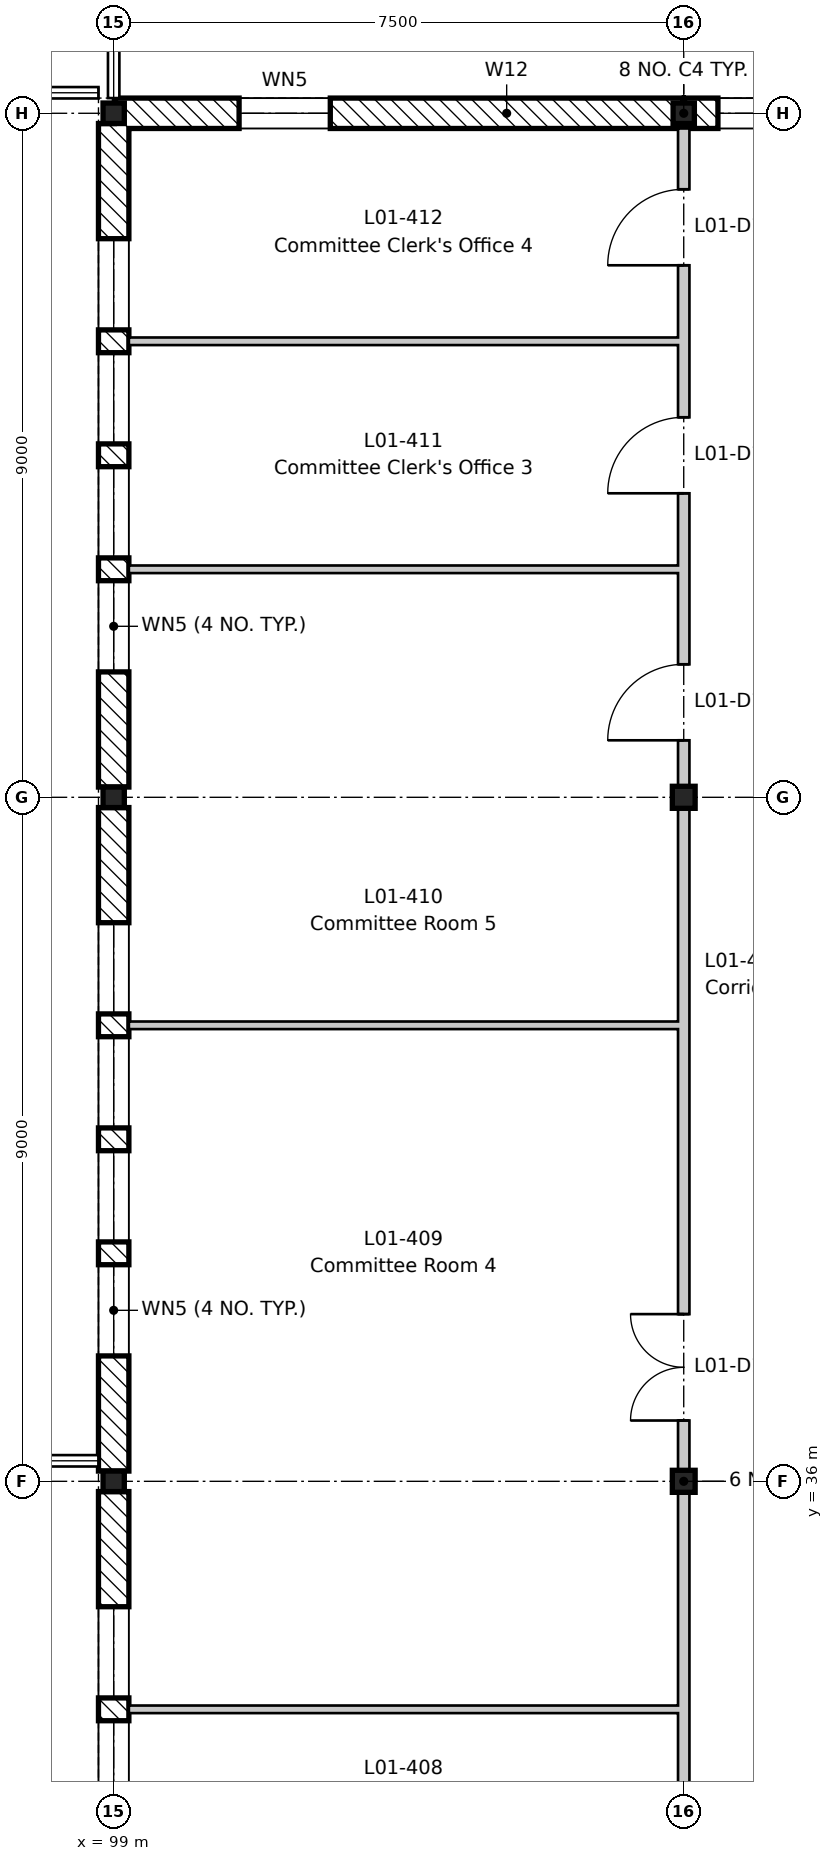
"""IFC4 building model, lengths in metres.
Left out: names, types, materials, properties, quantities, classifications, styles, units other than length and angle.
Written with IfcOpenShell. Run it as: python <this file> out.ifc"""

import sys

from ifc_helpers import new_model, si_unit, direction, frame, frame_2d, origin, origin_2d, place, context, subcontext, project, spatial, rectangle, i_section, extrude, element, fill, save


model = new_model("IFC4")
c1 = context("Model", 3, precision=1e-05, world=origin(), true_north=direction((0.0, 1.0)))
c2 = subcontext(c1, "Body", "Model", "MODEL_VIEW")
j1 = project(units=[si_unit("LENGTHUNIT", "METRE"), si_unit("PLANEANGLEUNIT", "RADIAN")], contexts=[c1])
p1 = place(None, origin())
s1 = spatial("IfcSite", under=j1, at=p1, CompositionType="ELEMENT")
p2 = place(p1, origin())
s2 = spatial("IfcBuilding", under=s1, at=p2, CompositionType="ELEMENT")
p3 = place(p2, frame((0.0, 0.0, 5.4)))
s3 = spatial("IfcBuildingStorey", under=s2, at=p3, CompositionType="ELEMENT", Elevation=5.4)
for number, where, z_axis, x_axis in (
    (1, (99.0, 36.0, -0.2), (0.0, 0.0, 1.0), (1.0, 0.0, 0.0)),
    (2, (99.0, 45.0, -0.2), (0.0, 0.0, 1.0), (1.0, 0.0, 0.0)),
    (3, (99.0, 54.0, -0.2), (0.0, 0.0, 1.0), (1.0, 0.0, 0.0)),
):
    element("IfcColumn", number, at=place(p3, frame(where, z_axis=z_axis, x_axis=x_axis)), inside=s3, PredefinedType="COLUMN", context=c2, shape_type="SweptSolid", body=[
        extrude(i_section(OverallWidth=0.28, OverallDepth=0.27, WebThickness=0.008, FlangeThickness=0.013, FilletRadius=0.024, at=origin_2d()), origin(), (0.0, 0.0, 1.0), 4.5),
    ])
for number, where, z_axis, x_axis in (
    (4, (106.5, 36.0, -0.2), (0.0, 0.0, 1.0), (1.0, 0.0, 0.0)),
    (5, (106.5, 45.0, -0.2), (0.0, 0.0, 1.0), (1.0, 0.0, 0.0)),
):
    element("IfcColumn", number, at=place(p3, frame(where, z_axis=z_axis, x_axis=x_axis)), inside=s3, PredefinedType="COLUMN", context=c2, shape_type="SweptSolid", body=[
        extrude(i_section(OverallWidth=0.3, OverallDepth=0.29, WebThickness=0.009, FlangeThickness=0.014, FilletRadius=0.027, at=origin_2d()), origin(), (0.0, 0.0, 1.0), 4.5),
    ])
p4 = place(p3, frame((106.5, 54.0, -0.2), z_axis=(0.0, 0.0, 1.0), x_axis=(1.0, 0.0, 0.0)))
e6 = element("IfcColumn", 6, at=p4, inside=s3, PredefinedType="COLUMN", context=c2, shape_type="SweptSolid", body=[
    extrude(i_section(OverallWidth=0.28, OverallDepth=0.27, WebThickness=0.008, FlangeThickness=0.013, FilletRadius=0.024, at=origin_2d()), origin(), (0.0, 0.0, 1.0), 4.5),
])
p5 = place(p3, frame((99.0, 27.135, 0.0), z_axis=(0.0, 0.0, 1.0), x_axis=(0.0, 1.0, 0.0)))
e7 = element("IfcWall", 7, at=p5, inside=s3, PredefinedType="STANDARD", context=c2, shape_type="SweptSolid", body=[
    extrude(rectangle(XDim=8.73, YDim=0.4, at=frame_2d((4.365, 0.0))), origin(), (0.0, 0.0, 1.0), 3.9),
])
p6 = place(p5, frame((1.515, 0.0, 0.6)))
e8 = element("IfcOpeningElement", 8, at=p6, cuts=e7, PredefinedType="OPENING", context=c2, shape_type="SweptSolid", body=[
    extrude(rectangle(XDim=1.2, YDim=3.0, at=frame_2d((0.6, 1.5))), frame((0.0, 0.21, 0.0), z_axis=(0.0, -1.0, 0.0), x_axis=(1.0, 0.0, 0.0)), (0.0, 0.0, 1.0), 0.42),
])
p7 = place(p5, frame((3.015, 0.0, 0.6)))
e9 = element("IfcOpeningElement", 9, at=p7, cuts=e7, PredefinedType="OPENING", context=c2, shape_type="SweptSolid", body=[
    extrude(rectangle(XDim=1.2, YDim=3.0, at=frame_2d((0.6, 1.5))), frame((0.0, 0.21, 0.0), z_axis=(0.0, -1.0, 0.0), x_axis=(1.0, 0.0, 0.0)), (0.0, 0.0, 1.0), 0.42),
])
p8 = place(p5, frame((4.515, 0.0, 0.6)))
e10 = element("IfcOpeningElement", 10, at=p8, cuts=e7, PredefinedType="OPENING", context=c2, shape_type="SweptSolid", body=[
    extrude(rectangle(XDim=1.2, YDim=3.0, at=frame_2d((0.6, 1.5))), frame((0.0, 0.21, 0.0), z_axis=(0.0, -1.0, 0.0), x_axis=(1.0, 0.0, 0.0)), (0.0, 0.0, 1.0), 0.42),
])
p9 = place(p5, frame((6.015, 0.0, 0.6)))
e11 = element("IfcOpeningElement", 11, at=p9, cuts=e7, PredefinedType="OPENING", context=c2, shape_type="SweptSolid", body=[
    extrude(rectangle(XDim=1.2, YDim=3.0, at=frame_2d((0.6, 1.5))), frame((0.0, 0.21, 0.0), z_axis=(0.0, -1.0, 0.0), x_axis=(1.0, 0.0, 0.0)), (0.0, 0.0, 1.0), 0.42),
])
p10 = place(p3, frame((99.0, 36.135, 0.0), z_axis=(0.0, 0.0, 1.0), x_axis=(0.0, 1.0, 0.0)))
e12 = element("IfcWall", 12, at=p10, inside=s3, PredefinedType="STANDARD", context=c2, shape_type="SweptSolid", body=[
    extrude(rectangle(XDim=8.73, YDim=0.4, at=frame_2d((4.365, 0.0))), origin(), (0.0, 0.0, 1.0), 3.9),
])
p11 = place(p10, frame((1.515, 0.0, 0.6)))
e13 = element("IfcOpeningElement", 13, at=p11, cuts=e12, PredefinedType="OPENING", context=c2, shape_type="SweptSolid", body=[
    extrude(rectangle(XDim=1.2, YDim=3.0, at=frame_2d((0.6, 1.5))), frame((0.0, 0.21, 0.0), z_axis=(0.0, -1.0, 0.0), x_axis=(1.0, 0.0, 0.0)), (0.0, 0.0, 1.0), 0.42),
])
p12 = place(p10, frame((3.015, 0.0, 0.6)))
e14 = element("IfcOpeningElement", 14, at=p12, cuts=e12, PredefinedType="OPENING", context=c2, shape_type="SweptSolid", body=[
    extrude(rectangle(XDim=1.2, YDim=3.0, at=frame_2d((0.6, 1.5))), frame((0.0, 0.21, 0.0), z_axis=(0.0, -1.0, 0.0), x_axis=(1.0, 0.0, 0.0)), (0.0, 0.0, 1.0), 0.42),
])
p13 = place(p10, frame((4.515, 0.0, 0.6)))
e15 = element("IfcOpeningElement", 15, at=p13, cuts=e12, PredefinedType="OPENING", context=c2, shape_type="SweptSolid", body=[
    extrude(rectangle(XDim=1.2, YDim=3.0, at=frame_2d((0.6, 1.5))), frame((0.0, 0.21, 0.0), z_axis=(0.0, -1.0, 0.0), x_axis=(1.0, 0.0, 0.0)), (0.0, 0.0, 1.0), 0.42),
])
p14 = place(p10, frame((6.015, 0.0, 0.6)))
e16 = element("IfcOpeningElement", 16, at=p14, cuts=e12, PredefinedType="OPENING", context=c2, shape_type="SweptSolid", body=[
    extrude(rectangle(XDim=1.2, YDim=3.0, at=frame_2d((0.6, 1.5))), frame((0.0, 0.21, 0.0), z_axis=(0.0, -1.0, 0.0), x_axis=(1.0, 0.0, 0.0)), (0.0, 0.0, 1.0), 0.42),
])
p15 = place(p3, frame((99.0, 45.135, 0.0), z_axis=(0.0, 0.0, 1.0), x_axis=(0.0, 1.0, 0.0)))
e17 = element("IfcWall", 17, at=p15, inside=s3, PredefinedType="STANDARD", context=c2, shape_type="SweptSolid", body=[
    extrude(rectangle(XDim=8.73, YDim=0.4, at=frame_2d((4.365, 0.0))), origin(), (0.0, 0.0, 1.0), 3.9),
])
p16 = place(p15, frame((1.515, 0.0, 0.6)))
e18 = element("IfcOpeningElement", 18, at=p16, cuts=e17, PredefinedType="OPENING", context=c2, shape_type="SweptSolid", body=[
    extrude(rectangle(XDim=1.2, YDim=3.0, at=frame_2d((0.6, 1.5))), frame((0.0, 0.21, 0.0), z_axis=(0.0, -1.0, 0.0), x_axis=(1.0, 0.0, 0.0)), (0.0, 0.0, 1.0), 0.42),
])
p17 = place(p15, frame((3.015, 0.0, 0.6)))
e19 = element("IfcOpeningElement", 19, at=p17, cuts=e17, PredefinedType="OPENING", context=c2, shape_type="SweptSolid", body=[
    extrude(rectangle(XDim=1.2, YDim=3.0, at=frame_2d((0.6, 1.5))), frame((0.0, 0.21, 0.0), z_axis=(0.0, -1.0, 0.0), x_axis=(1.0, 0.0, 0.0)), (0.0, 0.0, 1.0), 0.42),
])
p18 = place(p15, frame((4.515, 0.0, 0.6)))
e20 = element("IfcOpeningElement", 20, at=p18, cuts=e17, PredefinedType="OPENING", context=c2, shape_type="SweptSolid", body=[
    extrude(rectangle(XDim=1.2, YDim=3.0, at=frame_2d((0.6, 1.5))), frame((0.0, 0.21, 0.0), z_axis=(0.0, -1.0, 0.0), x_axis=(1.0, 0.0, 0.0)), (0.0, 0.0, 1.0), 0.42),
])
p19 = place(p15, frame((6.015, 0.0, 0.6)))
e21 = element("IfcOpeningElement", 21, at=p19, cuts=e17, PredefinedType="OPENING", context=c2, shape_type="SweptSolid", body=[
    extrude(rectangle(XDim=1.2, YDim=3.0, at=frame_2d((0.6, 1.5))), frame((0.0, 0.21, 0.0), z_axis=(0.0, -1.0, 0.0), x_axis=(1.0, 0.0, 0.0)), (0.0, 0.0, 1.0), 0.42),
])
p20 = place(p3, frame((99.009, 54.0, 0.0), z_axis=(0.0, 0.0, 1.0), x_axis=(1.0, 0.0, 0.0)))
e22 = element("IfcWall", 22, at=p20, inside=s3, PredefinedType="STANDARD", context=c2, shape_type="SweptSolid", body=[
    extrude(rectangle(XDim=7.482, YDim=0.4, at=frame_2d((3.741, 0.0))), origin(), (0.0, 0.0, 1.0), 3.97),
])
p21 = place(p20, frame((1.641, 0.0, 0.6)))
e23 = element("IfcOpeningElement", 23, at=p21, cuts=e22, PredefinedType="OPENING", context=c2, shape_type="SweptSolid", body=[
    extrude(rectangle(XDim=1.2, YDim=3.0, at=frame_2d((0.6, 1.5))), frame((0.0, 0.21, 0.0), z_axis=(0.0, -1.0, 0.0), x_axis=(1.0, 0.0, 0.0)), (0.0, 0.0, 1.0), 0.42),
])
p22 = place(p3, frame((106.509, 54.0, 0.0), z_axis=(0.0, 0.0, 1.0), x_axis=(1.0, 0.0, 0.0)))
e24 = element("IfcWall", 24, at=p22, inside=s3, PredefinedType="STANDARD", context=c2, shape_type="SweptSolid", body=[
    extrude(rectangle(XDim=2.982, YDim=0.4, at=frame_2d((1.491, 0.0))), origin(), (0.0, 0.0, 1.0), 4.1),
])
p23 = place(p22, frame((0.441, 0.0, 0.9)))
e25 = element("IfcOpeningElement", 25, at=p23, cuts=e24, PredefinedType="OPENING", context=c2, shape_type="SweptSolid", body=[
    extrude(rectangle(XDim=2.1, YDim=2.1, at=frame_2d((1.05, 1.05))), frame((0.0, 0.21, 0.0), z_axis=(0.0, -1.0, 0.0), x_axis=(1.0, 0.0, 0.0)), (0.0, 0.0, 1.0), 0.42),
])
for number, where, z_axis, x_axis in (
    (26, (99.2, 33.0, 0.0), (0.0, 0.0, 1.0), (1.0, 0.0, 0.0)),
    (27, (99.2, 42.0, 0.0), (0.0, 0.0, 1.0), (1.0, 0.0, 0.0)),
    (28, (99.2, 48.0, 0.0), (0.0, 0.0, 1.0), (1.0, 0.0, 0.0)),
    (29, (99.2, 51.0, 0.0), (0.0, 0.0, 1.0), (1.0, 0.0, 0.0)),
):
    element("IfcWall", number, at=place(p3, frame(where, z_axis=z_axis, x_axis=x_axis)), inside=s3, PredefinedType="PARTITIONING", context=c2, shape_type="SweptSolid", body=[
        extrude(rectangle(XDim=7.225, YDim=0.1, at=frame_2d((3.613, 0.0))), origin(), (0.0, 0.0, 1.0), 4.3),
    ])
p24 = place(p3, frame((106.5, 9.0, 0.0), z_axis=(0.0, 0.0, 1.0), x_axis=(0.0, 1.0, 0.0)))
e30 = element("IfcWall", 30, at=p24, inside=s3, PredefinedType="PARTITIONING", context=c2, shape_type="SweptSolid", body=[
    extrude(rectangle(XDim=44.8, YDim=0.15, at=frame_2d((22.4, 0.0))), origin(), (0.0, 0.0, 1.0), 3.78),
])
p25 = place(p24, frame((3.8, 0.0, 0.0)))
e31 = element("IfcOpeningElement", 31, at=p25, cuts=e30, PredefinedType="OPENING", context=c2, shape_type="SweptSolid", body=[
    extrude(rectangle(XDim=1.4, YDim=2.1, at=frame_2d((0.7, 1.05))), frame((0.0, 0.085, 0.0), z_axis=(0.0, -1.0, 0.0), x_axis=(1.0, 0.0, 0.0)), (0.0, 0.0, 1.0), 0.17),
])
p26 = place(p24, frame((12.8, 0.0, 0.0)))
e32 = element("IfcOpeningElement", 32, at=p26, cuts=e30, PredefinedType="OPENING", context=c2, shape_type="SweptSolid", body=[
    extrude(rectangle(XDim=1.4, YDim=2.1, at=frame_2d((0.7, 1.05))), frame((0.0, 0.085, 0.0), z_axis=(0.0, -1.0, 0.0), x_axis=(1.0, 0.0, 0.0)), (0.0, 0.0, 1.0), 0.17),
])
p27 = place(p24, frame((20.5, 0.0, 0.0)))
e33 = element("IfcOpeningElement", 33, at=p27, cuts=e30, PredefinedType="OPENING", context=c2, shape_type="SweptSolid", body=[
    extrude(rectangle(XDim=1.0, YDim=2.1, at=frame_2d((0.5, 1.05))), frame((0.0, 0.085, 0.0), z_axis=(0.0, -1.0, 0.0), x_axis=(1.0, 0.0, 0.0)), (0.0, 0.0, 1.0), 0.17),
])
p28 = place(p24, frame((27.8, 0.0, 0.0)))
e34 = element("IfcOpeningElement", 34, at=p28, cuts=e30, PredefinedType="OPENING", context=c2, shape_type="SweptSolid", body=[
    extrude(rectangle(XDim=1.4, YDim=2.1, at=frame_2d((0.7, 1.05))), frame((0.0, 0.085, 0.0), z_axis=(0.0, -1.0, 0.0), x_axis=(1.0, 0.0, 0.0)), (0.0, 0.0, 1.0), 0.17),
])
p29 = place(p24, frame((36.75, 0.0, 0.0)))
e35 = element("IfcOpeningElement", 35, at=p29, cuts=e30, PredefinedType="OPENING", context=c2, shape_type="SweptSolid", body=[
    extrude(rectangle(XDim=1.0, YDim=2.1, at=frame_2d((0.5, 1.05))), frame((0.0, 0.085, 0.0), z_axis=(0.0, -1.0, 0.0), x_axis=(1.0, 0.0, 0.0)), (0.0, 0.0, 1.0), 0.17),
])
p30 = place(p24, frame((40.0, 0.0, 0.0)))
e36 = element("IfcOpeningElement", 36, at=p30, cuts=e30, PredefinedType="OPENING", context=c2, shape_type="SweptSolid", body=[
    extrude(rectangle(XDim=1.0, YDim=2.1, at=frame_2d((0.5, 1.05))), frame((0.0, 0.085, 0.0), z_axis=(0.0, -1.0, 0.0), x_axis=(1.0, 0.0, 0.0)), (0.0, 0.0, 1.0), 0.17),
])
p31 = place(p24, frame((43.0, 0.0, 0.0)))
e37 = element("IfcOpeningElement", 37, at=p31, cuts=e30, PredefinedType="OPENING", context=c2, shape_type="SweptSolid", body=[
    extrude(rectangle(XDim=1.0, YDim=2.1, at=frame_2d((0.5, 1.05))), frame((0.0, 0.085, 0.0), z_axis=(0.0, -1.0, 0.0), x_axis=(1.0, 0.0, 0.0)), (0.0, 0.0, 1.0), 0.17),
])
p32 = place(p8, origin())
e38 = element("IfcWindow", 38, at=p32, inside=s3, PartitioningType="SINGLE_PANEL", PredefinedType="WINDOW", context=c2, shape_type="SweptSolid", body=[
    extrude(rectangle(XDim=1.2, YDim=3.0, at=frame_2d((0.6, 1.5))), frame((0.0, 0.03, 0.0), z_axis=(0.0, -1.0, 0.0), x_axis=(1.0, 0.0, 0.0)), (0.0, 0.0, 1.0), 0.06),
])
fill(e10, e38)
p33 = place(p9, origin())
e39 = element("IfcWindow", 39, at=p33, inside=s3, PartitioningType="SINGLE_PANEL", PredefinedType="WINDOW", context=c2, shape_type="SweptSolid", body=[
    extrude(rectangle(XDim=1.2, YDim=3.0, at=frame_2d((0.6, 1.5))), frame((0.0, 0.03, 0.0), z_axis=(0.0, -1.0, 0.0), x_axis=(1.0, 0.0, 0.0)), (0.0, 0.0, 1.0), 0.06),
])
fill(e11, e39)
p34 = place(p11, origin())
e40 = element("IfcWindow", 40, at=p34, inside=s3, PartitioningType="SINGLE_PANEL", PredefinedType="WINDOW", context=c2, shape_type="SweptSolid", body=[
    extrude(rectangle(XDim=1.2, YDim=3.0, at=frame_2d((0.6, 1.5))), frame((0.0, 0.03, 0.0), z_axis=(0.0, -1.0, 0.0), x_axis=(1.0, 0.0, 0.0)), (0.0, 0.0, 1.0), 0.06),
])
fill(e13, e40)
p35 = place(p12, origin())
e41 = element("IfcWindow", 41, at=p35, inside=s3, PartitioningType="SINGLE_PANEL", PredefinedType="WINDOW", context=c2, shape_type="SweptSolid", body=[
    extrude(rectangle(XDim=1.2, YDim=3.0, at=frame_2d((0.6, 1.5))), frame((0.0, 0.03, 0.0), z_axis=(0.0, -1.0, 0.0), x_axis=(1.0, 0.0, 0.0)), (0.0, 0.0, 1.0), 0.06),
])
fill(e14, e41)
p36 = place(p13, origin())
e42 = element("IfcWindow", 42, at=p36, inside=s3, PartitioningType="SINGLE_PANEL", PredefinedType="WINDOW", context=c2, shape_type="SweptSolid", body=[
    extrude(rectangle(XDim=1.2, YDim=3.0, at=frame_2d((0.6, 1.5))), frame((0.0, 0.03, 0.0), z_axis=(0.0, -1.0, 0.0), x_axis=(1.0, 0.0, 0.0)), (0.0, 0.0, 1.0), 0.06),
])
fill(e15, e42)
p37 = place(p14, origin())
e43 = element("IfcWindow", 43, at=p37, inside=s3, PartitioningType="SINGLE_PANEL", PredefinedType="WINDOW", context=c2, shape_type="SweptSolid", body=[
    extrude(rectangle(XDim=1.2, YDim=3.0, at=frame_2d((0.6, 1.5))), frame((0.0, 0.03, 0.0), z_axis=(0.0, -1.0, 0.0), x_axis=(1.0, 0.0, 0.0)), (0.0, 0.0, 1.0), 0.06),
])
fill(e16, e43)
p38 = place(p16, origin())
e44 = element("IfcWindow", 44, at=p38, inside=s3, PartitioningType="SINGLE_PANEL", PredefinedType="WINDOW", context=c2, shape_type="SweptSolid", body=[
    extrude(rectangle(XDim=1.2, YDim=3.0, at=frame_2d((0.6, 1.5))), frame((0.0, 0.03, 0.0), z_axis=(0.0, -1.0, 0.0), x_axis=(1.0, 0.0, 0.0)), (0.0, 0.0, 1.0), 0.06),
])
fill(e18, e44)
p39 = place(p17, origin())
e45 = element("IfcWindow", 45, at=p39, inside=s3, PartitioningType="SINGLE_PANEL", PredefinedType="WINDOW", context=c2, shape_type="SweptSolid", body=[
    extrude(rectangle(XDim=1.2, YDim=3.0, at=frame_2d((0.6, 1.5))), frame((0.0, 0.03, 0.0), z_axis=(0.0, -1.0, 0.0), x_axis=(1.0, 0.0, 0.0)), (0.0, 0.0, 1.0), 0.06),
])
fill(e19, e45)
p40 = place(p18, origin())
e46 = element("IfcWindow", 46, at=p40, inside=s3, PartitioningType="SINGLE_PANEL", PredefinedType="WINDOW", context=c2, shape_type="SweptSolid", body=[
    extrude(rectangle(XDim=1.2, YDim=3.0, at=frame_2d((0.6, 1.5))), frame((0.0, 0.03, 0.0), z_axis=(0.0, -1.0, 0.0), x_axis=(1.0, 0.0, 0.0)), (0.0, 0.0, 1.0), 0.06),
])
fill(e20, e46)
p41 = place(p19, origin())
e47 = element("IfcWindow", 47, at=p41, inside=s3, PartitioningType="SINGLE_PANEL", PredefinedType="WINDOW", context=c2, shape_type="SweptSolid", body=[
    extrude(rectangle(XDim=1.2, YDim=3.0, at=frame_2d((0.6, 1.5))), frame((0.0, 0.03, 0.0), z_axis=(0.0, -1.0, 0.0), x_axis=(1.0, 0.0, 0.0)), (0.0, 0.0, 1.0), 0.06),
])
fill(e21, e47)
p42 = place(p21, origin())
e48 = element("IfcWindow", 48, at=p42, inside=s3, PartitioningType="SINGLE_PANEL", PredefinedType="WINDOW", context=c2, shape_type="SweptSolid", body=[
    extrude(rectangle(XDim=1.2, YDim=3.0, at=frame_2d((0.6, 1.5))), frame((0.0, 0.03, 0.0), z_axis=(0.0, -1.0, 0.0), x_axis=(1.0, 0.0, 0.0)), (0.0, 0.0, 1.0), 0.06),
])
fill(e23, e48)
p43 = place(p23, origin())
e49 = element("IfcWindow", 49, at=p43, inside=s3, PartitioningType="SINGLE_PANEL", PredefinedType="WINDOW", context=c2, shape_type="SweptSolid", body=[
    extrude(rectangle(XDim=2.1, YDim=2.1, at=frame_2d((1.05, 1.05))), frame((0.0, 0.03, 0.0), z_axis=(0.0, -1.0, 0.0), x_axis=(1.0, 0.0, 0.0)), (0.0, 0.0, 1.0), 0.06),
])
fill(e25, e49)
p44 = place(p28, origin())
e50 = element("IfcDoor", 50, at=p44, inside=s3, OperationType="DOUBLE_DOOR_SINGLE_SWING", PredefinedType="DOOR", context=c2, shape_type="SweptSolid", body=[
    extrude(rectangle(XDim=1.4, YDim=2.1, at=frame_2d((0.7, 1.05))), frame((0.0, 0.025, 0.0), z_axis=(0.0, -1.0, 0.0), x_axis=(1.0, 0.0, 0.0)), (0.0, 0.0, 1.0), 0.05),
])
fill(e34, e50)
p45 = place(p29, origin())
e51 = element("IfcDoor", 51, at=p45, inside=s3, OperationType="SINGLE_SWING_LEFT", PredefinedType="DOOR", context=c2, shape_type="SweptSolid", body=[
    extrude(rectangle(XDim=1.0, YDim=2.1, at=frame_2d((0.5, 1.05))), frame((0.0, 0.025, 0.0), z_axis=(0.0, -1.0, 0.0), x_axis=(1.0, 0.0, 0.0)), (0.0, 0.0, 1.0), 0.05),
])
fill(e35, e51)
p46 = place(p30, origin())
e52 = element("IfcDoor", 52, at=p46, inside=s3, OperationType="SINGLE_SWING_LEFT", PredefinedType="DOOR", context=c2, shape_type="SweptSolid", body=[
    extrude(rectangle(XDim=1.0, YDim=2.1, at=frame_2d((0.5, 1.05))), frame((0.0, 0.025, 0.0), z_axis=(0.0, -1.0, 0.0), x_axis=(1.0, 0.0, 0.0)), (0.0, 0.0, 1.0), 0.05),
])
fill(e36, e52)
p47 = place(p31, origin())
e53 = element("IfcDoor", 53, at=p47, inside=s3, OperationType="SINGLE_SWING_LEFT", PredefinedType="DOOR", context=c2, shape_type="SweptSolid", body=[
    extrude(rectangle(XDim=1.0, YDim=2.1, at=frame_2d((0.5, 1.05))), frame((0.0, 0.025, 0.0), z_axis=(0.0, -1.0, 0.0), x_axis=(1.0, 0.0, 0.0)), (0.0, 0.0, 1.0), 0.05),
])
fill(e37, e53)
save(model, sys.argv[1])
